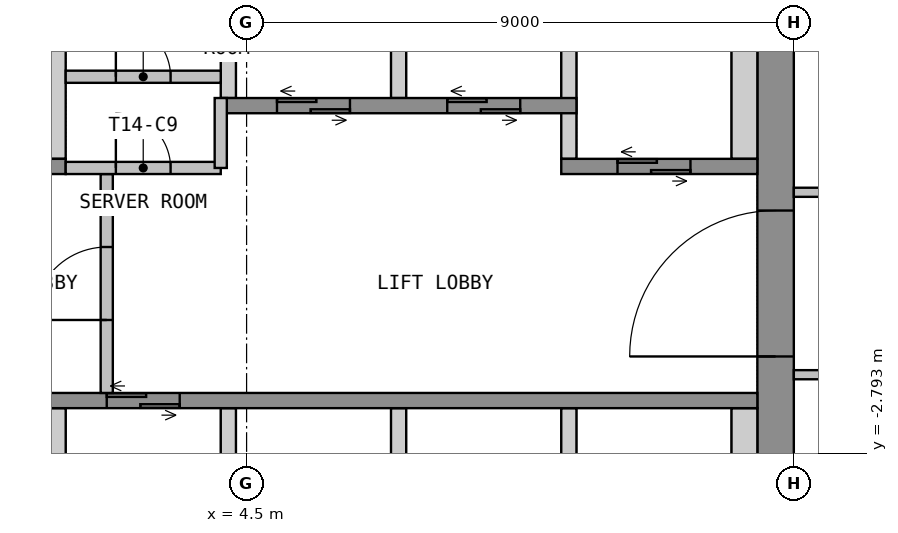
"""IFC4 building model, lengths in metres.
Left out: names, types, materials, properties, quantities, classifications, styles, units other than length and angle.
Written with IfcOpenShell. Run it as: python <this file> out.ifc"""

import sys

from ifc_helpers import new_model, si_unit, direction, frame, frame_2d, origin, place, context, subcontext, project, spatial, polyline, rectangle, outline, extrude, element, fill, save


model = new_model("IFC4")
c1 = context("Model", 3, precision=1e-05, world=origin(), true_north=direction((0.0, 1.0)))
c2 = subcontext(c1, "Body", "Model", "MODEL_VIEW")
j1 = project(units=[si_unit("LENGTHUNIT", "METRE"), si_unit("PLANEANGLEUNIT", "RADIAN")], contexts=[c1])
p1 = place(None, origin())
s1 = spatial("IfcSite", under=j1, at=p1, CompositionType="ELEMENT")
p2 = place(p1, origin())
s2 = spatial("IfcBuilding", under=s1, at=p2, CompositionType="ELEMENT")
p3 = place(p2, frame((0.0, 0.0, 195.6)))
s3 = spatial("IfcBuildingStorey", under=s2, at=p3, CompositionType="ELEMENT", Elevation=195.6)
p4 = place(p3, frame((13.2, -10.65, 0.0), z_axis=(0.0, 0.0, 1.0), x_axis=(0.0, 1.0, 0.0)))
e1 = element("IfcWall", 1, at=p4, inside=s3, PredefinedType="SHEAR", context=c2, shape_type="SweptSolid", body=[
    extrude(rectangle(XDim=21.3, YDim=0.6, at=frame_2d((10.65, 0.0))), origin(), (0.0, 0.0, 1.0), 3.55),
])
p5 = place(p4, frame((9.45, 0.0, 0.0)))
e2 = element("IfcOpeningElement", 2, at=p5, cuts=e1, PredefinedType="OPENING", context=c2, shape_type="SweptSolid", body=[
    extrude(rectangle(XDim=2.4, YDim=2.1, at=frame_2d((1.2, 1.05))), frame((0.0, 0.31, 0.0), z_axis=(0.0, -1.0, 0.0), x_axis=(1.0, 0.0, 0.0)), (0.0, 0.0, 1.0), 0.62),
])
p6 = place(p3, origin())
e3 = element("IfcWall", 3, at=p6, inside=s3, PredefinedType="SHEAR", context=c2, shape_type="SweptSolid", body=[
    extrude(outline(polyline([(1.275, 2.05), (1.525, 2.05), (1.525, 4.75), (1.275, 4.75), (1.275, 2.05)])), origin(), (0.0, 0.0, 1.0), 3.55),
])
p7 = place(p3, origin())
e4 = element("IfcWall", 4, at=p7, inside=s3, PredefinedType="SHEAR", context=c2, shape_type="SweptSolid", body=[
    extrude(outline(polyline([(9.675, 2.05), (9.925, 2.05), (9.925, 4.75), (9.675, 4.75), (9.675, 2.05)])), origin(), (0.0, 0.0, 1.0), 3.55),
])
p8 = place(p3, origin())
e5 = element("IfcWall", 5, at=p8, inside=s3, PredefinedType="SHEAR", context=c2, shape_type="SweptSolid", body=[
    extrude(outline(polyline([(12.475, 2.05), (12.9, 2.05), (12.9, 4.75), (12.475, 4.75), (12.475, 2.05)])), origin(), (0.0, 0.0, 1.0), 3.55),
])
p9 = place(p3, origin())
e6 = element("IfcWall", 6, at=p9, inside=s3, PredefinedType="SHEAR", context=c2, shape_type="SweptSolid", body=[
    extrude(outline(polyline([(4.075, 3.05), (4.325, 3.05), (4.325, 4.75), (4.075, 4.75), (4.075, 3.05)])), origin(), (0.0, 0.0, 1.0), 3.55),
])
p10 = place(p3, origin())
e7 = element("IfcWall", 7, at=p10, inside=s3, PredefinedType="SHEAR", context=c2, shape_type="SweptSolid", body=[
    extrude(outline(polyline([(6.875, 3.05), (7.125, 3.05), (7.125, 4.75), (6.875, 4.75), (6.875, 3.05)])), origin(), (0.0, 0.0, 1.0), 3.55),
])
p11 = place(p3, frame((-1.525, 1.925, 0.0), z_axis=(0.0, 0.0, 1.0), x_axis=(1.0, 0.0, 0.0)))
e8 = element("IfcWall", 8, at=p11, inside=s3, PredefinedType="SHEAR", context=c2, shape_type="SweptSolid", body=[
    extrude(rectangle(XDim=3.05, YDim=0.25, at=frame_2d((1.525, 0.0))), origin(), (0.0, 0.0, 1.0), 3.55),
])
p12 = place(p11, frame((0.925, 0.0, 0.0)))
e9 = element("IfcOpeningElement", 9, at=p12, cuts=e8, PredefinedType="OPENING", context=c2, shape_type="SweptSolid", body=[
    extrude(rectangle(XDim=1.2, YDim=2.1, at=frame_2d((0.6, 1.05))), frame((0.0, 0.135, 0.0), z_axis=(0.0, -1.0, 0.0), x_axis=(1.0, 0.0, 0.0)), (0.0, 0.0, 1.0), 0.27),
])
p13 = place(p3, frame((4.075, 2.925, 0.0), z_axis=(0.0, 0.0, 1.0), x_axis=(1.0, 0.0, 0.0)))
e10 = element("IfcWall", 10, at=p13, inside=s3, PredefinedType="SHEAR", context=c2, shape_type="SweptSolid", body=[
    extrude(rectangle(XDim=5.85, YDim=0.25, at=frame_2d((2.925, 0.0))), origin(), (0.0, 0.0, 1.0), 3.55),
])
p14 = place(p13, frame((0.925, 0.0, 0.0)))
e11 = element("IfcOpeningElement", 11, at=p14, cuts=e10, PredefinedType="OPENING", context=c2, shape_type="SweptSolid", body=[
    extrude(rectangle(XDim=1.2, YDim=2.1, at=frame_2d((0.6, 1.05))), frame((0.0, 0.135, 0.0), z_axis=(0.0, -1.0, 0.0), x_axis=(1.0, 0.0, 0.0)), (0.0, 0.0, 1.0), 0.27),
])
p15 = place(p13, frame((3.725, 0.0, 0.0)))
e12 = element("IfcOpeningElement", 12, at=p15, cuts=e10, PredefinedType="OPENING", context=c2, shape_type="SweptSolid", body=[
    extrude(rectangle(XDim=1.2, YDim=2.1, at=frame_2d((0.6, 1.05))), frame((0.0, 0.135, 0.0), z_axis=(0.0, -1.0, 0.0), x_axis=(1.0, 0.0, 0.0)), (0.0, 0.0, 1.0), 0.27),
])
p16 = place(p3, frame((9.675, 1.925, 0.0), z_axis=(0.0, 0.0, 1.0), x_axis=(1.0, 0.0, 0.0)))
e13 = element("IfcWall", 13, at=p16, inside=s3, PredefinedType="SHEAR", context=c2, shape_type="SweptSolid", body=[
    extrude(rectangle(XDim=3.225, YDim=0.25, at=frame_2d((1.612, 0.0))), origin(), (0.0, 0.0, 1.0), 3.55),
])
p17 = place(p16, frame((0.925, 0.0, 0.0)))
e14 = element("IfcOpeningElement", 14, at=p17, cuts=e13, PredefinedType="OPENING", context=c2, shape_type="SweptSolid", body=[
    extrude(rectangle(XDim=1.2, YDim=2.1, at=frame_2d((0.6, 1.05))), frame((0.0, 0.135, 0.0), z_axis=(0.0, -1.0, 0.0), x_axis=(1.0, 0.0, 0.0)), (0.0, 0.0, 1.0), 0.27),
])
p18 = place(p3, origin())
e15 = element("IfcWall", 15, at=p18, inside=s3, PredefinedType="SHEAR", context=c2, shape_type="SweptSolid", body=[
    extrude(outline(polyline([(1.275, -4.75), (1.525, -4.75), (1.525, -2.05), (1.275, -2.05), (1.275, -4.75)])), origin(), (0.0, 0.0, 1.0), 3.55),
])
p19 = place(p3, origin())
e16 = element("IfcWall", 16, at=p19, inside=s3, PredefinedType="SHEAR", context=c2, shape_type="SweptSolid", body=[
    extrude(outline(polyline([(4.075, -4.75), (4.325, -4.75), (4.325, -2.05), (4.075, -2.05), (4.075, -4.75)])), origin(), (0.0, 0.0, 1.0), 3.55),
])
p20 = place(p3, origin())
e17 = element("IfcWall", 17, at=p20, inside=s3, PredefinedType="SHEAR", context=c2, shape_type="SweptSolid", body=[
    extrude(outline(polyline([(6.875, -4.75), (7.125, -4.75), (7.125, -2.05), (6.875, -2.05), (6.875, -4.75)])), origin(), (0.0, 0.0, 1.0), 3.55),
])
p21 = place(p3, origin())
e18 = element("IfcWall", 18, at=p21, inside=s3, PredefinedType="SHEAR", context=c2, shape_type="SweptSolid", body=[
    extrude(outline(polyline([(9.675, -4.75), (9.925, -4.75), (9.925, -2.05), (9.675, -2.05), (9.675, -4.75)])), origin(), (0.0, 0.0, 1.0), 3.55),
])
p22 = place(p3, origin())
e19 = element("IfcWall", 19, at=p22, inside=s3, PredefinedType="SHEAR", context=c2, shape_type="SweptSolid", body=[
    extrude(outline(polyline([(12.475, -4.75), (12.9, -4.75), (12.9, -2.05), (12.475, -2.05), (12.475, -4.75)])), origin(), (0.0, 0.0, 1.0), 3.55),
])
p23 = place(p3, frame((-1.525, -1.925, 0.0), z_axis=(0.0, 0.0, 1.0), x_axis=(1.0, 0.0, 0.0)))
e20 = element("IfcWall", 20, at=p23, inside=s3, PredefinedType="SHEAR", context=c2, shape_type="SweptSolid", body=[
    extrude(rectangle(XDim=14.425, YDim=0.25, at=frame_2d((7.212, 0.0))), origin(), (0.0, 0.0, 1.0), 3.55),
])
p24 = place(p23, frame((0.925, 0.0, 0.0)))
e21 = element("IfcOpeningElement", 21, at=p24, cuts=e20, PredefinedType="OPENING", context=c2, shape_type="SweptSolid", body=[
    extrude(rectangle(XDim=1.2, YDim=2.1, at=frame_2d((0.6, 1.05))), frame((0.0, 0.135, 0.0), z_axis=(0.0, -1.0, 0.0), x_axis=(1.0, 0.0, 0.0)), (0.0, 0.0, 1.0), 0.27),
])
p25 = place(p23, frame((3.725, 0.0, 0.0)))
e22 = element("IfcOpeningElement", 22, at=p25, cuts=e20, PredefinedType="OPENING", context=c2, shape_type="SweptSolid", body=[
    extrude(rectangle(XDim=1.2, YDim=2.1, at=frame_2d((0.6, 1.05))), frame((0.0, 0.135, 0.0), z_axis=(0.0, -1.0, 0.0), x_axis=(1.0, 0.0, 0.0)), (0.0, 0.0, 1.0), 0.27),
])
p26 = place(p3, frame((2.2, -1.8, 0.0), z_axis=(0.0, 0.0, 1.0), x_axis=(0.0, 1.0, 0.0)))
e23 = element("IfcWall", 23, at=p26, inside=s3, PredefinedType="PARTITIONING", context=c2, shape_type="SweptSolid", body=[
    extrude(rectangle(XDim=3.6, YDim=0.2, at=frame_2d((1.8, 0.0))), origin(), (0.0, 0.0, 1.0), 3.55),
])
p27 = place(p26, frame((1.2, 0.0, 0.0)))
e24 = element("IfcOpeningElement", 24, at=p27, cuts=e23, PredefinedType="OPENING", context=c2, shape_type="SweptSolid", body=[
    extrude(rectangle(XDim=1.2, YDim=2.1, at=frame_2d((0.6, 1.05))), frame((0.0, 0.11, 0.0), z_axis=(0.0, -1.0, 0.0), x_axis=(1.0, 0.0, 0.0)), (0.0, 0.0, 1.0), 0.22),
])
p28 = place(p3, frame((1.525, 3.4, 0.0), z_axis=(0.0, 0.0, 1.0), x_axis=(1.0, 0.0, 0.0)))
e25 = element("IfcWall", 25, at=p28, inside=s3, PredefinedType="PARTITIONING", context=c2, shape_type="SweptSolid", body=[
    extrude(rectangle(XDim=2.55, YDim=0.2, at=frame_2d((1.275, 0.0))), origin(), (0.0, 0.0, 1.0), 3.55),
])
p29 = place(p28, frame((0.825, 0.0, 0.0)))
e26 = element("IfcOpeningElement", 26, at=p29, cuts=e25, PredefinedType="OPENING", context=c2, shape_type="SweptSolid", body=[
    extrude(rectangle(XDim=0.9, YDim=2.1, at=frame_2d((0.45, 1.05))), frame((0.0, 0.11, 0.0), z_axis=(0.0, -1.0, 0.0), x_axis=(1.0, 0.0, 0.0)), (0.0, 0.0, 1.0), 0.22),
])
p30 = place(p3, frame((1.525, 1.9, 0.0), z_axis=(0.0, 0.0, 1.0), x_axis=(1.0, 0.0, 0.0)))
e27 = element("IfcWall", 27, at=p30, inside=s3, PredefinedType="PARTITIONING", context=c2, shape_type="SweptSolid", body=[
    extrude(rectangle(XDim=2.55, YDim=0.2, at=frame_2d((1.275, 0.0))), origin(), (0.0, 0.0, 1.0), 3.55),
])
p31 = place(p30, frame((0.825, 0.0, 0.0)))
e28 = element("IfcOpeningElement", 28, at=p31, cuts=e27, PredefinedType="OPENING", context=c2, shape_type="SweptSolid", body=[
    extrude(rectangle(XDim=0.9, YDim=2.1, at=frame_2d((0.45, 1.05))), frame((0.0, 0.11, 0.0), z_axis=(0.0, -1.0, 0.0), x_axis=(1.0, 0.0, 0.0)), (0.0, 0.0, 1.0), 0.22),
])
p32 = place(p3, frame((4.075, 1.9, 0.0), z_axis=(0.0, 0.0, 1.0), x_axis=(0.0, 1.0, 0.0)))
e29 = element("IfcWall", 29, at=p32, inside=s3, PredefinedType="PARTITIONING", context=c2, shape_type="SweptSolid", body=[
    extrude(rectangle(XDim=1.15, YDim=0.2, at=frame_2d((0.575, 0.0))), origin(), (0.0, 0.0, 1.0), 3.55),
])
for number, where, z_axis, x_axis in (
    (30, (13.5, -1.5, 0.0), (0.0, 0.0, 1.0), (1.0, 0.0, 0.0)),
    (31, (18.075, 1.5, 0.0), (0.0, 0.0, 1.0), (-1.0, 0.0, 0.0)),
):
    element("IfcWall", number, at=place(p3, frame(where, z_axis=z_axis, x_axis=x_axis)), inside=s3, PredefinedType="PARTITIONING", context=c2, shape_type="SweptSolid", body=[
        extrude(rectangle(XDim=4.575, YDim=0.15, at=frame_2d((2.288, 0.0))), origin(), (0.0, 0.0, 1.0), 3.55),
    ])
p33 = place(p5, origin())
e32 = element("IfcDoor", 32, at=p33, inside=s3, OperationType="DOUBLE_DOOR_DOUBLE_SWING", PredefinedType="DOOR", context=c2, shape_type="SweptSolid", body=[
    extrude(rectangle(XDim=2.4, YDim=2.1, at=frame_2d((1.2, 1.05))), frame((0.0, 0.025, 0.0), z_axis=(0.0, -1.0, 0.0), x_axis=(1.0, 0.0, 0.0)), (0.0, 0.0, 1.0), 0.05),
])
fill(e2, e32)
p34 = place(p14, origin())
e33 = element("IfcDoor", 33, at=p34, inside=s3, OperationType="DOUBLE_DOOR_SLIDING", PredefinedType="DOOR", context=c2, shape_type="SweptSolid", body=[
    extrude(rectangle(XDim=1.2, YDim=2.1, at=frame_2d((0.6, 1.05))), frame((0.0, 0.025, 0.0), z_axis=(0.0, -1.0, 0.0), x_axis=(1.0, 0.0, 0.0)), (0.0, 0.0, 1.0), 0.05),
])
fill(e11, e33)
p35 = place(p15, origin())
e34 = element("IfcDoor", 34, at=p35, inside=s3, OperationType="DOUBLE_DOOR_SLIDING", PredefinedType="DOOR", context=c2, shape_type="SweptSolid", body=[
    extrude(rectangle(XDim=1.2, YDim=2.1, at=frame_2d((0.6, 1.05))), frame((0.0, 0.025, 0.0), z_axis=(0.0, -1.0, 0.0), x_axis=(1.0, 0.0, 0.0)), (0.0, 0.0, 1.0), 0.05),
])
fill(e12, e34)
p36 = place(p17, origin())
e35 = element("IfcDoor", 35, at=p36, inside=s3, OperationType="DOUBLE_DOOR_SLIDING", PredefinedType="DOOR", context=c2, shape_type="SweptSolid", body=[
    extrude(rectangle(XDim=1.2, YDim=2.1, at=frame_2d((0.6, 1.05))), frame((0.0, 0.025, 0.0), z_axis=(0.0, -1.0, 0.0), x_axis=(1.0, 0.0, 0.0)), (0.0, 0.0, 1.0), 0.05),
])
fill(e14, e35)
p37 = place(p25, origin())
e36 = element("IfcDoor", 36, at=p37, inside=s3, OperationType="DOUBLE_DOOR_SLIDING", PredefinedType="DOOR", context=c2, shape_type="SweptSolid", body=[
    extrude(rectangle(XDim=1.2, YDim=2.1, at=frame_2d((0.6, 1.05))), frame((0.0, 0.025, 0.0), z_axis=(0.0, -1.0, 0.0), x_axis=(1.0, 0.0, 0.0)), (0.0, 0.0, 1.0), 0.05),
])
fill(e22, e36)
p38 = place(p27, origin())
e37 = element("IfcDoor", 37, at=p38, inside=s3, OperationType="SINGLE_SWING_LEFT", PredefinedType="DOOR", context=c2, shape_type="SweptSolid", body=[
    extrude(rectangle(XDim=1.2, YDim=2.1, at=frame_2d((0.6, 1.05))), frame((0.0, 0.025, 0.0), z_axis=(0.0, -1.0, 0.0), x_axis=(1.0, 0.0, 0.0)), (0.0, 0.0, 1.0), 0.05),
])
fill(e24, e37)
p39 = place(p29, origin())
e38 = element("IfcDoor", 38, at=p39, inside=s3, OperationType="SINGLE_SWING_LEFT", PredefinedType="DOOR", context=c2, shape_type="SweptSolid", body=[
    extrude(rectangle(XDim=0.9, YDim=2.1, at=frame_2d((0.45, 1.05))), frame((0.0, 0.025, 0.0), z_axis=(0.0, -1.0, 0.0), x_axis=(1.0, 0.0, 0.0)), (0.0, 0.0, 1.0), 0.05),
])
fill(e26, e38)
p40 = place(p31, origin())
e39 = element("IfcDoor", 39, at=p40, inside=s3, OperationType="SINGLE_SWING_LEFT", PredefinedType="DOOR", context=c2, shape_type="SweptSolid", body=[
    extrude(rectangle(XDim=0.9, YDim=2.1, at=frame_2d((0.45, 1.05))), frame((0.0, 0.025, 0.0), z_axis=(0.0, -1.0, 0.0), x_axis=(1.0, 0.0, 0.0)), (0.0, 0.0, 1.0), 0.05),
])
fill(e28, e39)
save(model, sys.argv[1])
